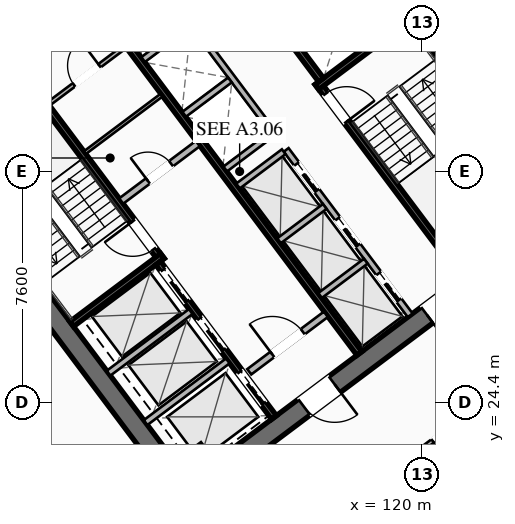
"""IFC4 building model, lengths in metres.
Left out: names, types, materials, properties, quantities, classifications, styles, units other than length and angle.
Written with IfcOpenShell. Run it as: python <this file> out.ifc"""

import sys

from ifc_helpers import new_model, si_unit, direction, frame, frame_2d, origin, place, context, subcontext, project, spatial, rectangle, extrude, element, fill, save


model = new_model("IFC4")
c1 = context("Model", 3, precision=1e-05, world=origin(), true_north=direction((0.0, 1.0)))
c2 = subcontext(c1, "Body", "Model", "MODEL_VIEW")
j1 = project(units=[si_unit("LENGTHUNIT", "METRE"), si_unit("PLANEANGLEUNIT", "RADIAN")], contexts=[c1])
p1 = place(None, origin())
s1 = spatial("IfcSite", under=j1, at=p1, CompositionType="ELEMENT")
p2 = place(p1, origin())
s2 = spatial("IfcBuilding", under=s1, at=p2, CompositionType="ELEMENT")
p3 = place(p2, frame((0.0, 0.0, 70.75)))
s3 = spatial("IfcBuildingStorey", under=s2, at=p3, CompositionType="ELEMENT", Elevation=70.75)
for number, where, z_axis, x_axis in (
    (1, (112.476, 21.107, 0.0), (0.0, 0.0, 1.0), (-0.6, 0.8, 0.0)),
    (2, (115.524, 42.893, 0.0), (0.0, 0.0, 1.0), (0.6, -0.8, 0.0)),
):
    element("IfcWall", number, at=place(p3, frame(where, z_axis=z_axis, x_axis=x_axis)), inside=s3, PredefinedType="SHEAR", context=c2, shape_type="SweptSolid", body=[
        extrude(rectangle(XDim=15.6, YDim=0.65, at=frame_2d((7.8, 0.0))), origin(), (0.0, 0.0, 1.0), 3.55),
    ])
p4 = place(p3, frame((124.429, 30.478, 0.0), z_axis=(0.0, 0.0, 1.0), x_axis=(-0.799998028465, -0.600002628705, 0.0)))
e3 = element("IfcWall", 3, at=p4, inside=s3, PredefinedType="SHEAR", context=c2, shape_type="SweptSolid", body=[
    extrude(rectangle(XDim=14.86, YDim=0.65, at=frame_2d((7.43, 0.0))), origin(), (0.0, 0.0, 1.0), 3.55),
])
p5 = place(p4, frame((9.13, 0.0, 0.0)))
e4 = element("IfcOpeningElement", 4, at=p5, cuts=e3, PredefinedType="OPENING", context=c2, shape_type="SweptSolid", body=[
    extrude(rectangle(XDim=1.25, YDim=2.25, at=frame_2d((0.625, 1.125))), frame((0.0, 0.335, 0.0), z_axis=(0.0, -1.0, 0.0), x_axis=(1.0, 0.0, 0.0)), (0.0, 0.0, 1.0), 0.67),
])
p6 = place(p4, frame((4.08, 0.0, 0.0)))
e5 = element("IfcOpeningElement", 5, at=p6, cuts=e3, PredefinedType="OPENING", context=c2, shape_type="SweptSolid", body=[
    extrude(rectangle(XDim=1.25, YDim=2.25, at=frame_2d((0.625, 1.125))), frame((0.0, 0.335, 0.0), z_axis=(0.0, -1.0, 0.0), x_axis=(1.0, 0.0, 0.0)), (0.0, 0.0, 1.0), 0.67),
])
p7 = place(p3, frame((103.571, 33.522, 0.0), z_axis=(0.0, 0.0, 1.0), x_axis=(0.799998028465, 0.600002628705, 0.0)))
e6 = element("IfcWall", 6, at=p7, inside=s3, PredefinedType="SHEAR", context=c2, shape_type="SweptSolid", body=[
    extrude(rectangle(XDim=14.86, YDim=0.65, at=frame_2d((7.43, 0.0))), origin(), (0.0, 0.0, 1.0), 3.55),
])
p8 = place(p7, frame((4.48, 0.0, 0.0)))
e7 = element("IfcOpeningElement", 7, at=p8, cuts=e6, PredefinedType="OPENING", context=c2, shape_type="SweptSolid", body=[
    extrude(rectangle(XDim=1.25, YDim=2.25, at=frame_2d((0.625, 1.125))), frame((0.0, 0.335, 0.0), z_axis=(0.0, -1.0, 0.0), x_axis=(1.0, 0.0, 0.0)), (0.0, 0.0, 1.0), 0.67),
])
p9 = place(p7, frame((9.53, 0.0, 0.0)))
e8 = element("IfcOpeningElement", 8, at=p9, cuts=e6, PredefinedType="OPENING", context=c2, shape_type="SweptSolid", body=[
    extrude(rectangle(XDim=1.25, YDim=2.25, at=frame_2d((0.625, 1.125))), frame((0.0, 0.335, 0.0), z_axis=(0.0, -1.0, 0.0), x_axis=(1.0, 0.0, 0.0)), (0.0, 0.0, 1.0), 0.67),
])
p10 = place(p3, frame((111.44, 29.08, 0.0), z_axis=(0.0, 0.0, 1.0), x_axis=(-0.600009827119, 0.799992629566, 0.0)))
e9 = element("IfcWall", 9, at=p10, inside=s3, PredefinedType="SHEAR", context=c2, shape_type="SweptSolid", body=[
    extrude(rectangle(XDim=7.95, YDim=0.2, at=frame_2d((3.975, 0.0))), origin(), (0.0, 0.0, 1.0), 3.35),
])
p11 = place(p10, frame((0.45, 0.0, 0.0)))
e10 = element("IfcOpeningElement", 10, at=p11, cuts=e9, PredefinedType="OPENING", context=c2, shape_type="SweptSolid", body=[
    extrude(rectangle(XDim=1.15, YDim=2.2, at=frame_2d((0.575, 1.1))), frame((0.0, 0.11, 0.0), z_axis=(0.0, -1.0, 0.0), x_axis=(1.0, 0.0, 0.0)), (0.0, 0.0, 1.0), 0.22),
])
p12 = place(p3, frame((108.476, 26.982, 0.0), z_axis=(0.0, 0.0, 1.0), x_axis=(0.799984290658, 0.600020945218, 0.0)))
e11 = element("IfcWall", 11, at=p12, inside=s3, PredefinedType="SHEAR", context=c2, shape_type="SweptSolid", body=[
    extrude(rectangle(XDim=3.73, YDim=0.2, at=frame_2d((1.865, 0.0))), origin(), (0.0, 0.0, 1.0), 3.35),
])
p13 = place(p3, frame((116.56, 34.92, 0.0), z_axis=(0.0, 0.0, 1.0), x_axis=(0.600009827119, -0.799992629566, 0.0)))
e12 = element("IfcWall", 12, at=p13, inside=s3, PredefinedType="SHEAR", context=c2, shape_type="SweptSolid", body=[
    extrude(rectangle(XDim=7.95, YDim=0.2, at=frame_2d((3.975, 0.0))), origin(), (0.0, 0.0, 1.0), 3.35),
])
p14 = place(p13, frame((0.45, 0.0, 0.0)))
e13 = element("IfcOpeningElement", 13, at=p14, cuts=e12, PredefinedType="OPENING", context=c2, shape_type="SweptSolid", body=[
    extrude(rectangle(XDim=1.15, YDim=2.2, at=frame_2d((0.575, 1.1))), frame((0.0, 0.11, 0.0), z_axis=(0.0, -1.0, 0.0), x_axis=(1.0, 0.0, 0.0)), (0.0, 0.0, 1.0), 0.22),
])
p15 = place(p3, frame((116.54, 34.78, 0.0), z_axis=(0.0, 0.0, 1.0), x_axis=(0.799984290658, 0.600020945218, 0.0)))
e14 = element("IfcWall", 14, at=p15, inside=s3, PredefinedType="SHEAR", context=c2, shape_type="SweptSolid", body=[
    extrude(rectangle(XDim=3.73, YDim=0.2, at=frame_2d((1.865, 0.0))), origin(), (0.0, 0.0, 1.0), 3.35),
])
p16 = place(p3, frame((117.938, 26.016, 0.0), z_axis=(0.0, 0.0, 1.0), x_axis=(-0.600005463273, 0.799995902516, 0.0)))
e15 = element("IfcWall", 15, at=p16, inside=s3, PredefinedType="SHEAR", context=c2, shape_type="SweptSolid", body=[
    extrude(rectangle(XDim=14.3, YDim=0.2, at=frame_2d((7.15, 0.0))), origin(), (0.0, 0.0, 1.0), 3.35),
])
p17 = place(p3, frame((110.104, 31.028, 0.0), z_axis=(0.0, 0.0, 1.0), x_axis=(0.800018601094, 0.59997519774, 0.0)))
e16 = element("IfcWall", 16, at=p17, inside=s3, PredefinedType="SOLIDWALL", context=c2, shape_type="SweptSolid", body=[
    extrude(rectangle(XDim=3.15, YDim=0.22, at=frame_2d((1.575, 0.0))), origin(), (0.0, 0.0, 1.0), 2.703),
])
p18 = place(p17, frame((1.1, 0.0, 0.0)))
e17 = element("IfcOpeningElement", 17, at=p18, cuts=e16, PredefinedType="OPENING", context=c2, shape_type="SweptSolid", body=[
    extrude(rectangle(XDim=0.95, YDim=2.05, at=frame_2d((0.475, 1.025))), frame((0.0, 0.12, 0.0), z_axis=(0.0, -1.0, 0.0), x_axis=(1.0, 0.0, 0.0)), (0.0, 0.0, 1.0), 0.24),
])
p19 = place(p3, frame((114.316, 25.412, 0.0), z_axis=(0.0, 0.0, 1.0), x_axis=(0.800018601094, 0.59997519774, 0.0)))
e18 = element("IfcWall", 18, at=p19, inside=s3, PredefinedType="SOLIDWALL", context=c2, shape_type="SweptSolid", body=[
    extrude(rectangle(XDim=3.15, YDim=0.22, at=frame_2d((1.575, 0.0))), origin(), (0.0, 0.0, 1.0), 2.703),
])
p20 = place(p19, frame((0.95, 0.0, 0.0)))
e19 = element("IfcOpeningElement", 19, at=p20, cuts=e18, PredefinedType="OPENING", context=c2, shape_type="SweptSolid", body=[
    extrude(rectangle(XDim=1.25, YDim=2.25, at=frame_2d((0.625, 1.125))), frame((0.0, 0.12, 0.0), z_axis=(0.0, -1.0, 0.0), x_axis=(1.0, 0.0, 0.0)), (0.0, 0.0, 1.0), 0.24),
])
p21 = place(p3, frame((115.13, 23.91, 0.0), z_axis=(0.0, 0.0, 1.0), x_axis=(-0.599975393228, 0.800018454488, 0.0)))
e20 = element("IfcWall", 20, at=p21, inside=s3, PredefinedType="SHEAR", context=c2, shape_type="SweptSolid", body=[
    extrude(rectangle(XDim=6.35, YDim=0.2, at=frame_2d((3.175, 0.0))), origin(), (0.0, 0.0, 1.0), 3.35),
])
p22 = place(p21, frame((4.775, 0.0, 0.0)))
e21 = element("IfcOpeningElement", 21, at=p22, cuts=e20, PredefinedType="OPENING", context=c2, shape_type="SweptSolid", body=[
    extrude(rectangle(XDim=1.3, YDim=2.25, at=frame_2d((0.65, 1.125))), frame((0.0, 0.11, 0.0), z_axis=(0.0, -1.0, 0.0), x_axis=(1.0, 0.0, 0.0)), (0.0, 0.0, 1.0), 0.22),
])
p23 = place(p21, frame((2.775, 0.0, 0.0)))
e22 = element("IfcOpeningElement", 22, at=p23, cuts=e20, PredefinedType="OPENING", context=c2, shape_type="SweptSolid", body=[
    extrude(rectangle(XDim=1.3, YDim=2.25, at=frame_2d((0.65, 1.125))), frame((0.0, 0.11, 0.0), z_axis=(0.0, -1.0, 0.0), x_axis=(1.0, 0.0, 0.0)), (0.0, 0.0, 1.0), 0.22),
])
p24 = place(p21, frame((0.575, 0.0, 0.0)))
e23 = element("IfcOpeningElement", 23, at=p24, cuts=e20, PredefinedType="OPENING", context=c2, shape_type="SweptSolid", body=[
    extrude(rectangle(XDim=1.3, YDim=2.25, at=frame_2d((0.65, 1.125))), frame((0.0, 0.11, 0.0), z_axis=(0.0, -1.0, 0.0), x_axis=(1.0, 0.0, 0.0)), (0.0, 0.0, 1.0), 0.22),
])
for number, where, z_axis, x_axis in (
    (24, (110.906, 23.742, 0.0), (0.0, 0.0, 1.0), (0.8, 0.6, 0.0)),
    (25, (109.688, 25.366, 0.0), (0.0, 0.0, 1.0), (0.8, 0.6, 0.0)),
):
    element("IfcWall", number, at=place(p3, frame(where, z_axis=z_axis, x_axis=x_axis)), inside=s3, PredefinedType="SOLIDWALL", context=c2, shape_type="SweptSolid", body=[
        extrude(rectangle(XDim=3.38, YDim=0.2, at=frame_2d((1.69, 0.0))), origin(), (0.0, 0.0, 1.0), 3.35),
    ])
p25 = place(p3, frame((112.87, 40.09, 0.0), z_axis=(0.0, 0.0, 1.0), x_axis=(0.599975393228, -0.800018454488, 0.0)))
e26 = element("IfcWall", 26, at=p25, inside=s3, PredefinedType="SHEAR", context=c2, shape_type="SweptSolid", body=[
    extrude(rectangle(XDim=6.35, YDim=0.2, at=frame_2d((3.175, 0.0))), origin(), (0.0, 0.0, 1.0), 3.35),
])
p26 = place(p3, frame((107.71, 34.22, 0.0), z_axis=(0.0, 0.0, 1.0), x_axis=(0.799981399002, 0.60002480053, 0.0)))
e27 = element("IfcWall", 27, at=p26, inside=s3, PredefinedType="PARTITIONING", context=c2, shape_type="SweptSolid", body=[
    extrude(rectangle(XDim=3.15, YDim=0.135, at=frame_2d((1.575, 0.0))), origin(), (0.0, 0.0, 1.0), 2.703),
])
p27 = place(p26, frame((1.05, 0.0, 0.0)))
e28 = element("IfcOpeningElement", 28, at=p27, cuts=e27, PredefinedType="OPENING", context=c2, shape_type="SweptSolid", body=[
    extrude(rectangle(XDim=1.05, YDim=2.2, at=frame_2d((0.525, 1.1))), frame((0.0, 0.077, 0.0), z_axis=(0.0, -1.0, 0.0), x_axis=(1.0, 0.0, 0.0)), (0.0, 0.0, 1.0), 0.155),
])
p28 = place(p3, frame((108.91, 32.62, 0.0), z_axis=(0.0, 0.0, 1.0), x_axis=(0.800018601094, 0.59997519774, 0.0)))
e29 = element("IfcWall", 29, at=p28, inside=s3, PredefinedType="PARTITIONING", context=c2, shape_type="SweptSolid", body=[
    extrude(rectangle(XDim=3.15, YDim=0.11, at=frame_2d((1.575, 0.0))), origin(), (0.0, 0.0, 1.0), 2.703),
])
p29 = place(p3, frame((119.61, 27.27, 0.0), z_axis=(0.0, 0.0, 1.0), x_axis=(-0.600011488909, 0.79999138319, 0.0)))
e30 = element("IfcWall", 30, at=p29, inside=s3, PredefinedType="SOLIDWALL", context=c2, shape_type="SweptSolid", body=[
    extrude(rectangle(XDim=6.8, YDim=0.2, at=frame_2d((3.4, 0.0))), origin(), (0.0, 0.0, 1.0), 3.35),
])
p30 = place(p29, frame((0.625, 0.0, 0.0)))
e31 = element("IfcOpeningElement", 31, at=p30, cuts=e30, PredefinedType="OPENING", context=c2, shape_type="SweptSolid", body=[
    extrude(rectangle(XDim=1.1, YDim=2.2, at=frame_2d((0.55, 1.1))), frame((0.0, 0.11, 0.0), z_axis=(0.0, -1.0, 0.0), x_axis=(1.0, 0.0, 0.0)), (0.0, 0.0, 1.0), 0.22),
])
p31 = place(p29, frame((2.875, 0.0, 0.0)))
e32 = element("IfcOpeningElement", 32, at=p31, cuts=e30, PredefinedType="OPENING", context=c2, shape_type="SweptSolid", body=[
    extrude(rectangle(XDim=1.1, YDim=2.2, at=frame_2d((0.55, 1.1))), frame((0.0, 0.11, 0.0), z_axis=(0.0, -1.0, 0.0), x_axis=(1.0, 0.0, 0.0)), (0.0, 0.0, 1.0), 0.22),
])
p32 = place(p29, frame((5.125, 0.0, 0.0)))
e33 = element("IfcOpeningElement", 33, at=p32, cuts=e30, PredefinedType="OPENING", context=c2, shape_type="SweptSolid", body=[
    extrude(rectangle(XDim=1.1, YDim=2.2, at=frame_2d((0.55, 1.1))), frame((0.0, 0.11, 0.0), z_axis=(0.0, -1.0, 0.0), x_axis=(1.0, 0.0, 0.0)), (0.0, 0.0, 1.0), 0.22),
])
p33 = place(p3, frame((116.646, 27.922, 0.0), z_axis=(0.0, 0.0, 1.0), x_axis=(0.8, 0.6, 0.0)))
e34 = element("IfcWall", 34, at=p33, inside=s3, PredefinedType="SOLIDWALL", context=c2, shape_type="SweptSolid", body=[
    extrude(rectangle(XDim=1.88, YDim=0.2, at=frame_2d((0.94, 0.0))), origin(), (0.0, 0.0, 1.0), 3.35),
])
p34 = place(p3, frame((115.296, 29.722, 0.0), z_axis=(0.0, 0.0, 1.0), x_axis=(0.799984418148, 0.600020775241, 0.0)))
e35 = element("IfcWall", 35, at=p34, inside=s3, PredefinedType="SOLIDWALL", context=c2, shape_type="SweptSolid", body=[
    extrude(rectangle(XDim=1.88, YDim=0.2, at=frame_2d((0.94, 0.0))), origin(), (0.0, 0.0, 1.0), 3.35),
])
p35 = place(p3, frame((113.946, 31.522, 0.0), z_axis=(0.0, 0.0, 1.0), x_axis=(0.8, 0.6, 0.0)))
e36 = element("IfcWall", 36, at=p35, inside=s3, PredefinedType="SOLIDWALL", context=c2, shape_type="SweptSolid", body=[
    extrude(rectangle(XDim=1.88, YDim=0.2, at=frame_2d((0.94, 0.0))), origin(), (0.0, 0.0, 1.0), 3.35),
])
p36 = place(p3, frame((115.11, 33.27, 0.0), z_axis=(0.0, 0.0, 1.0), x_axis=(-0.600011488909, 0.79999138319, 0.0)))
e37 = element("IfcWall", 37, at=p36, inside=s3, PredefinedType="SOLIDWALL", context=c2, shape_type="SweptSolid", body=[
    extrude(rectangle(XDim=6.8, YDim=0.2, at=frame_2d((3.4, 0.0))), origin(), (0.0, 0.0, 1.0), 3.35),
])
p37 = place(p3, frame((113.526, 32.082, 0.0), z_axis=(0.0, 0.0, 1.0), x_axis=(0.800046745961, 0.599937666993, 0.0)))
e38 = element("IfcWall", 38, at=p37, inside=s3, PredefinedType="SOLIDWALL", context=c2, shape_type="SweptSolid", body=[
    extrude(rectangle(XDim=1.88, YDim=0.2, at=frame_2d((0.94, 0.0))), origin(), (0.0, 0.0, 1.0), 3.35),
])
p38 = place(p3, frame((112.176, 33.882, 0.0), z_axis=(0.0, 0.0, 1.0), x_axis=(0.8, 0.6, 0.0)))
e39 = element("IfcWall", 39, at=p38, inside=s3, PredefinedType="SOLIDWALL", context=c2, shape_type="SweptSolid", body=[
    extrude(rectangle(XDim=1.88, YDim=0.2, at=frame_2d((0.94, 0.0))), origin(), (0.0, 0.0, 1.0), 3.35),
])
p39 = place(p3, frame((110.826, 35.682, 0.0), z_axis=(0.0, 0.0, 1.0), x_axis=(0.799984418148, 0.600020775241, 0.0)))
e40 = element("IfcWall", 40, at=p39, inside=s3, PredefinedType="SOLIDWALL", context=c2, shape_type="SweptSolid", body=[
    extrude(rectangle(XDim=1.88, YDim=0.2, at=frame_2d((0.94, 0.0))), origin(), (0.0, 0.0, 1.0), 3.35),
])
p40 = place(p3, frame((98.516, 34.012, 0.0), z_axis=(0.0, 0.0, 1.0), x_axis=(0.8, 0.6, 0.0)))
e41 = element("IfcWall", 41, at=p40, inside=s3, PredefinedType="PARTITIONING", context=c2, shape_type="SweptSolid", body=[
    extrude(rectangle(XDim=28.23, YDim=0.135, at=frame_2d((14.115, 0.0))), origin(), (0.0, 0.0, 1.0), 2.703),
])
p41 = place(p40, frame((0.3, 0.0, 0.0)))
e42 = element("IfcOpeningElement", 42, at=p41, cuts=e41, PredefinedType="OPENING", context=c2, shape_type="SweptSolid", body=[
    extrude(rectangle(XDim=0.95, YDim=2.05, at=frame_2d((0.475, 1.025))), frame((0.0, 0.077, 0.0), z_axis=(0.0, -1.0, 0.0), x_axis=(1.0, 0.0, 0.0)), (0.0, 0.0, 1.0), 0.155),
])
p42 = place(p40, frame((6.84, 0.0, 0.0)))
e43 = element("IfcOpeningElement", 43, at=p42, cuts=e41, PredefinedType="OPENING", context=c2, shape_type="SweptSolid", body=[
    extrude(rectangle(XDim=0.95, YDim=2.05, at=frame_2d((0.475, 1.025))), frame((0.0, 0.077, 0.0), z_axis=(0.0, -1.0, 0.0), x_axis=(1.0, 0.0, 0.0)), (0.0, 0.0, 1.0), 0.155),
])
p43 = place(p40, frame((10.863, 0.0, 0.0)))
e44 = element("IfcOpeningElement", 44, at=p43, cuts=e41, PredefinedType="OPENING", context=c2, shape_type="SweptSolid", body=[
    extrude(rectangle(XDim=0.95, YDim=2.05, at=frame_2d((0.475, 1.025))), frame((0.0, 0.077, 0.0), z_axis=(0.0, -1.0, 0.0), x_axis=(1.0, 0.0, 0.0)), (0.0, 0.0, 1.0), 0.155),
])
p44 = place(p40, frame((26.98, 0.0, 0.0)))
e45 = element("IfcOpeningElement", 45, at=p44, cuts=e41, PredefinedType="OPENING", context=c2, shape_type="SweptSolid", body=[
    extrude(rectangle(XDim=0.95, YDim=2.05, at=frame_2d((0.475, 1.025))), frame((0.0, 0.077, 0.0), z_axis=(0.0, -1.0, 0.0), x_axis=(1.0, 0.0, 0.0)), (0.0, 0.0, 1.0), 0.155),
])
p45 = place(p3, frame((134.18, 33.51, 0.0), z_axis=(0.0, 0.0, 1.0), x_axis=(-0.8, -0.6, 0.0)))
e46 = element("IfcWall", 46, at=p45, inside=s3, PredefinedType="PARTITIONING", context=c2, shape_type="SweptSolid", body=[
    extrude(rectangle(XDim=28.23, YDim=0.135, at=frame_2d((14.115, 0.0))), origin(), (0.0, 0.0, 1.0), 2.703),
])
p46 = place(p45, frame((26.9, 0.0, 0.0)))
e47 = element("IfcOpeningElement", 47, at=p46, cuts=e46, PredefinedType="OPENING", context=c2, shape_type="SweptSolid", body=[
    extrude(rectangle(XDim=0.95, YDim=2.05, at=frame_2d((0.475, 1.025))), frame((0.0, 0.077, 0.0), z_axis=(0.0, -1.0, 0.0), x_axis=(1.0, 0.0, 0.0)), (0.0, 0.0, 1.0), 0.155),
])
p47 = place(p45, frame((20.399, 0.0, 0.0)))
e48 = element("IfcOpeningElement", 48, at=p47, cuts=e46, PredefinedType="OPENING", context=c2, shape_type="SweptSolid", body=[
    extrude(rectangle(XDim=0.95, YDim=2.05, at=frame_2d((0.475, 1.025))), frame((0.0, 0.077, 0.0), z_axis=(0.0, -1.0, 0.0), x_axis=(1.0, 0.0, 0.0)), (0.0, 0.0, 1.0), 0.155),
])
p48 = place(p45, frame((16.339, 0.0, 0.0)))
e49 = element("IfcOpeningElement", 49, at=p48, cuts=e46, PredefinedType="OPENING", context=c2, shape_type="SweptSolid", body=[
    extrude(rectangle(XDim=0.95, YDim=2.05, at=frame_2d((0.475, 1.025))), frame((0.0, 0.077, 0.0), z_axis=(0.0, -1.0, 0.0), x_axis=(1.0, 0.0, 0.0)), (0.0, 0.0, 1.0), 0.155),
])
p49 = place(p45, frame((0.38, 0.0, 0.0)))
e50 = element("IfcOpeningElement", 50, at=p49, cuts=e46, PredefinedType="OPENING", context=c2, shape_type="SweptSolid", body=[
    extrude(rectangle(XDim=0.95, YDim=2.05, at=frame_2d((0.475, 1.025))), frame((0.0, 0.077, 0.0), z_axis=(0.0, -1.0, 0.0), x_axis=(1.0, 0.0, 0.0)), (0.0, 0.0, 1.0), 0.155),
])
p50 = place(p3, frame((111.548, 16.636, 0.0), z_axis=(0.0, 0.0, 1.0), x_axis=(-0.600003610192, 0.799997292343, 0.0)))
e51 = element("IfcWall", 51, at=p50, inside=s3, PredefinedType="PARTITIONING", context=c2, shape_type="SweptSolid", body=[
    extrude(rectangle(XDim=21.64, YDim=0.135, at=frame_2d((10.82, 0.0))), origin(), (0.0, 0.0, 1.0), 2.703),
])
p51 = place(p50, frame((0.3, 0.0, 0.0)))
e52 = element("IfcOpeningElement", 52, at=p51, cuts=e51, PredefinedType="OPENING", context=c2, shape_type="SweptSolid", body=[
    extrude(rectangle(XDim=0.95, YDim=2.05, at=frame_2d((0.475, 1.025))), frame((0.0, 0.077, 0.0), z_axis=(0.0, -1.0, 0.0), x_axis=(1.0, 0.0, 0.0)), (0.0, 0.0, 1.0), 0.155),
])
p52 = place(p5, origin())
e53 = element("IfcDoor", 53, at=p52, inside=s3, OperationType="SINGLE_SWING_LEFT", PredefinedType="DOOR", context=c2, shape_type="SweptSolid", body=[
    extrude(rectangle(XDim=1.25, YDim=2.25, at=frame_2d((0.625, 1.125))), frame((0.0, 0.025, 0.0), z_axis=(0.0, -1.0, 0.0), x_axis=(1.0, 0.0, 0.0)), (0.0, 0.0, 1.0), 0.05),
])
fill(e4, e53)
p53 = place(p6, origin())
e54 = element("IfcDoor", 54, at=p53, inside=s3, OperationType="SINGLE_SWING_RIGHT", PredefinedType="DOOR", context=c2, shape_type="SweptSolid", body=[
    extrude(rectangle(XDim=1.25, YDim=2.25, at=frame_2d((0.625, 1.125))), frame((0.0, 0.025, 0.0), z_axis=(0.0, -1.0, 0.0), x_axis=(1.0, 0.0, 0.0)), (0.0, 0.0, 1.0), 0.05),
])
fill(e5, e54)
p54 = place(p11, origin())
e55 = element("IfcDoor", 55, at=p54, inside=s3, OperationType="SINGLE_SWING_RIGHT", PredefinedType="DOOR", context=c2, shape_type="SweptSolid", body=[
    extrude(rectangle(XDim=1.15, YDim=2.2, at=frame_2d((0.575, 1.1))), frame((0.0, 0.025, 0.0), z_axis=(0.0, -1.0, 0.0), x_axis=(1.0, 0.0, 0.0)), (0.0, 0.0, 1.0), 0.05),
])
fill(e10, e55)
p55 = place(p14, origin())
e56 = element("IfcDoor", 56, at=p55, inside=s3, OperationType="SINGLE_SWING_RIGHT", PredefinedType="DOOR", context=c2, shape_type="SweptSolid", body=[
    extrude(rectangle(XDim=1.15, YDim=2.2, at=frame_2d((0.575, 1.1))), frame((0.0, 0.025, 0.0), z_axis=(0.0, -1.0, 0.0), x_axis=(1.0, 0.0, 0.0)), (0.0, 0.0, 1.0), 0.05),
])
fill(e13, e56)
p56 = place(p20, origin())
e57 = element("IfcDoor", 57, at=p56, inside=s3, OperationType="SINGLE_SWING_LEFT", PredefinedType="DOOR", context=c2, shape_type="SweptSolid", body=[
    extrude(rectangle(XDim=1.25, YDim=2.25, at=frame_2d((0.625, 1.125))), frame((0.0, 0.025, 0.0), z_axis=(0.0, -1.0, 0.0), x_axis=(1.0, 0.0, 0.0)), (0.0, 0.0, 1.0), 0.05),
])
fill(e19, e57)
p57 = place(p27, origin())
e58 = element("IfcDoor", 58, at=p57, inside=s3, OperationType="SINGLE_SWING_RIGHT", PredefinedType="DOOR", context=c2, shape_type="SweptSolid", body=[
    extrude(rectangle(XDim=1.05, YDim=2.2, at=frame_2d((0.525, 1.1))), frame((0.0, 0.025, 0.0), z_axis=(0.0, -1.0, 0.0), x_axis=(1.0, 0.0, 0.0)), (0.0, 0.0, 1.0), 0.05),
])
fill(e28, e58)
p58 = place(p18, origin())
e59 = element("IfcDoor", 59, at=p58, inside=s3, OperationType="SINGLE_SWING_LEFT", PredefinedType="DOOR", context=c2, shape_type="SweptSolid", body=[
    extrude(rectangle(XDim=0.95, YDim=2.05, at=frame_2d((0.475, 1.025))), frame((0.0, 0.025, 0.0), z_axis=(0.0, -1.0, 0.0), x_axis=(1.0, 0.0, 0.0)), (0.0, 0.0, 1.0), 0.05),
])
fill(e17, e59)
p59 = place(p48, origin())
e60 = element("IfcDoor", 60, at=p59, inside=s3, OperationType="SINGLE_SWING_RIGHT", PredefinedType="DOOR", context=c2, shape_type="SweptSolid", body=[
    extrude(rectangle(XDim=0.95, YDim=2.05, at=frame_2d((0.475, 1.025))), frame((0.0, 0.025, 0.0), z_axis=(0.0, -1.0, 0.0), x_axis=(1.0, 0.0, 0.0)), (0.0, 0.0, 1.0), 0.05),
])
fill(e49, e60)
p60 = place(p22, origin())
e61 = element("IfcDoor", 61, at=p60, inside=s3, OperationType="SLIDING_TO_LEFT", PredefinedType="DOOR", context=c2, shape_type="SweptSolid", body=[
    extrude(rectangle(XDim=1.3, YDim=2.25, at=frame_2d((0.65, 1.125))), frame((0.0, 0.025, 0.0), z_axis=(0.0, -1.0, 0.0), x_axis=(1.0, 0.0, 0.0)), (0.0, 0.0, 1.0), 0.05),
])
fill(e21, e61)
p61 = place(p23, origin())
e62 = element("IfcDoor", 62, at=p61, inside=s3, OperationType="SLIDING_TO_LEFT", PredefinedType="DOOR", context=c2, shape_type="SweptSolid", body=[
    extrude(rectangle(XDim=1.3, YDim=2.25, at=frame_2d((0.65, 1.125))), frame((0.0, 0.025, 0.0), z_axis=(0.0, -1.0, 0.0), x_axis=(1.0, 0.0, 0.0)), (0.0, 0.0, 1.0), 0.05),
])
fill(e22, e62)
p62 = place(p24, origin())
e63 = element("IfcDoor", 63, at=p62, inside=s3, OperationType="SLIDING_TO_LEFT", PredefinedType="DOOR", context=c2, shape_type="SweptSolid", body=[
    extrude(rectangle(XDim=1.3, YDim=2.25, at=frame_2d((0.65, 1.125))), frame((0.0, 0.025, 0.0), z_axis=(0.0, -1.0, 0.0), x_axis=(1.0, 0.0, 0.0)), (0.0, 0.0, 1.0), 0.05),
])
fill(e23, e63)
p63 = place(p30, origin())
e64 = element("IfcDoor", 64, at=p63, inside=s3, OperationType="SLIDING_TO_LEFT", PredefinedType="DOOR", context=c2, shape_type="SweptSolid", body=[
    extrude(rectangle(XDim=1.1, YDim=2.2, at=frame_2d((0.55, 1.1))), frame((0.0, 0.025, 0.0), z_axis=(0.0, -1.0, 0.0), x_axis=(1.0, 0.0, 0.0)), (0.0, 0.0, 1.0), 0.05),
])
fill(e31, e64)
p64 = place(p31, origin())
e65 = element("IfcDoor", 65, at=p64, inside=s3, OperationType="SLIDING_TO_LEFT", PredefinedType="DOOR", context=c2, shape_type="SweptSolid", body=[
    extrude(rectangle(XDim=1.1, YDim=2.2, at=frame_2d((0.55, 1.1))), frame((0.0, 0.025, 0.0), z_axis=(0.0, -1.0, 0.0), x_axis=(1.0, 0.0, 0.0)), (0.0, 0.0, 1.0), 0.05),
])
fill(e32, e65)
p65 = place(p32, origin())
e66 = element("IfcDoor", 66, at=p65, inside=s3, OperationType="SLIDING_TO_LEFT", PredefinedType="DOOR", context=c2, shape_type="SweptSolid", body=[
    extrude(rectangle(XDim=1.1, YDim=2.2, at=frame_2d((0.55, 1.1))), frame((0.0, 0.025, 0.0), z_axis=(0.0, -1.0, 0.0), x_axis=(1.0, 0.0, 0.0)), (0.0, 0.0, 1.0), 0.05),
])
fill(e33, e66)
save(model, sys.argv[1])
